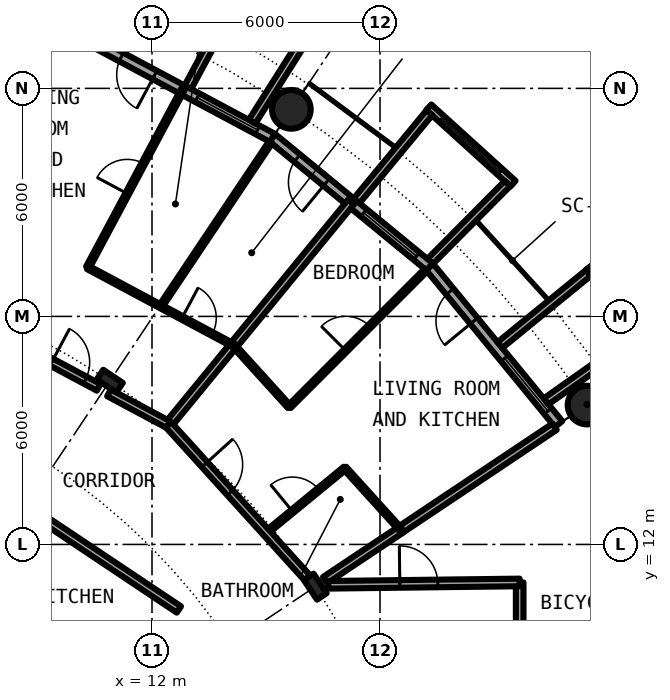
"""IFC4 building model, lengths in metres.
Left out: names, types, materials, properties, quantities, classifications, styles, units other than length and angle.
Written with IfcOpenShell. Run it as: python <this file> out.ifc"""

import sys

from ifc_helpers import new_model, si_unit, direction, frame, frame_2d, origin, origin_2d, place, context, subcontext, project, spatial, rectangle, circle, hollow_circle, i_section, extrude, element, fill, save


model = new_model("IFC4")
c1 = context("Model", 3, precision=1e-05, world=origin(), true_north=direction((0.0, 1.0)))
c2 = subcontext(c1, "Body", "Model", "MODEL_VIEW")
j1 = project(units=[si_unit("LENGTHUNIT", "METRE"), si_unit("PLANEANGLEUNIT", "RADIAN")], contexts=[c1])
p1 = place(None, origin())
s1 = spatial("IfcSite", under=j1, at=p1, CompositionType="ELEMENT")
p2 = place(p1, origin())
s2 = spatial("IfcBuilding", under=s1, at=p2, CompositionType="ELEMENT")
p3 = place(p2, frame((0.0, 0.0, 22.8)))
s3 = spatial("IfcBuildingStorey", under=s2, at=p3, CompositionType="ELEMENT", Elevation=22.8)
for number, where, z_axis, x_axis in (
    (1, (23.448, 15.667, 0.0), (0.0, 0.0, 1.0), (1.0, 0.0, 0.0)),
    (2, (15.667, 23.448, 0.0), (0.0, 0.0, 1.0), (1.0, 0.0, 0.0)),
):
    element("IfcColumn", number, at=place(p3, frame(where, z_axis=z_axis, x_axis=x_axis)), inside=s3, PredefinedType="COLUMN", context=c2, shape_type="SweptSolid", body=[
        extrude(hollow_circle(Radius=0.508, WallThickness=0.05, at=origin_2d()), origin(), (0.0, 0.0, 1.0), 3.05),
    ])
for number, where, z_axis, x_axis in (
    (3, (16.297, 10.889, 0.0), (0.0, 0.0, 1.0), (0.831, 0.556, 0.0)),
    (4, (10.889, 16.297, 0.0), (0.0, 0.0, 1.0), (0.556, 0.831, 0.0)),
):
    element("IfcColumn", number, at=place(p3, frame(where, z_axis=z_axis, x_axis=x_axis)), inside=s3, PredefinedType="COLUMN", context=c2, shape_type="SweptSolid", body=[
        extrude(i_section(OverallWidth=0.305, OverallDepth=0.62, WebThickness=0.021, FlangeThickness=0.04, FilletRadius=0.027, at=origin_2d()), origin(), (0.0, 0.0, 1.0), 3.05),
    ])
p4 = place(p3, frame((22.699, 15.167, 0.0), z_axis=(0.0, 0.0, 1.0), x_axis=(-0.634382322723, 0.773019449054, 0.0)))
e5 = element("IfcWall", 5, at=p4, inside=s3, PredefinedType="SOLIDWALL", context=c2, shape_type="SweptSolid", body=[
    extrude(rectangle(XDim=5.352, YDim=0.25, at=frame_2d((2.676, 0.0))), origin(), (0.0, 0.0, 1.0), 2.7),
])
p5 = place(p4, frame((0.441, 0.0, 0.3)))
e6 = element("IfcOpeningElement", 6, at=p5, cuts=e5, PredefinedType="OPENING", context=c2, shape_type="SweptSolid", body=[
    extrude(rectangle(XDim=1.8, YDim=2.1, at=frame_2d((0.9, 1.05))), frame((0.0, 0.135, 0.0), z_axis=(0.0, -1.0, 0.0), x_axis=(1.0, 0.0, 0.0)), (0.0, 0.0, 1.0), 0.27),
])
p6 = place(p4, frame((3.51, 0.0, 0.0)))
e7 = element("IfcOpeningElement", 7, at=p6, cuts=e5, PredefinedType="OPENING", context=c2, shape_type="SweptSolid", body=[
    extrude(rectangle(XDim=1.0, YDim=2.2, at=frame_2d((0.5, 1.1))), frame((0.0, 0.135, 0.0), z_axis=(0.0, -1.0, 0.0), x_axis=(1.0, 0.0, 0.0)), (0.0, 0.0, 1.0), 0.27),
])
p7 = place(p3, frame((24.909, 17.427, -0.03), z_axis=(0.0, 0.0, 1.0), x_axis=(-0.60418752353, 0.796842165306, 0.0)))
e8 = element("IfcWall", 8, at=p7, inside=s3, PredefinedType="SOLIDWALL", context=c2, shape_type="SweptSolid", body=[
    extrude(rectangle(XDim=2.337, YDim=0.2, at=frame_2d((1.168, 0.0))), origin(), (0.0, 0.0, 1.0), 2.73),
])
p8 = place(p7, frame((0.128, 0.0, 0.33)))
e9 = element("IfcOpeningElement", 9, at=p8, cuts=e8, PredefinedType="OPENING", context=c2, shape_type="SweptSolid", body=[
    extrude(circle(Radius=1.04, at=frame_2d((1.04, 1.04))), frame((0.0, 0.11, 0.0), z_axis=(0.0, -1.0, 0.0), x_axis=(1.0, 0.0, 0.0)), (0.0, 0.0, 1.0), 0.22),
])
p9 = place(p3, frame((22.37, 15.765, -0.03), z_axis=(0.0, 0.0, 1.0), x_axis=(0.817256123454, 0.576274612209, 0.0)))
e10 = element("IfcWall", 10, at=p9, inside=s3, PredefinedType="SOLIDWALL", context=c2, shape_type="SweptSolid", body=[
    extrude(rectangle(XDim=2.933, YDim=0.2, at=frame_2d((1.466, 0.0))), origin(), (0.0, 0.0, 1.0), 2.73),
])
p10 = place(p3, frame((21.155, 17.246, -0.03), z_axis=(0.0, 0.0, 1.0), x_axis=(0.775179004516, 0.631741648902, 0.0)))
e11 = element("IfcWall", 11, at=p10, inside=s3, PredefinedType="SOLIDWALL", context=c2, shape_type="SweptSolid", body=[
    extrude(rectangle(XDim=3.006, YDim=0.2, at=frame_2d((1.503, 0.0))), origin(), (0.0, 0.0, 1.0), 2.73),
])
p11 = place(p3, frame((19.304, 19.304, 0.0), z_axis=(0.0, 0.0, 1.0), x_axis=(-0.773019449054, 0.634382322723, 0.0)))
e12 = element("IfcWall", 12, at=p11, inside=s3, PredefinedType="SOLIDWALL", context=c2, shape_type="SweptSolid", body=[
    extrude(rectangle(XDim=5.352, YDim=0.25, at=frame_2d((2.676, 0.0))), origin(), (0.0, 0.0, 1.0), 2.7),
])
p12 = place(p11, frame((0.441, 0.0, 0.3)))
e13 = element("IfcOpeningElement", 13, at=p12, cuts=e12, PredefinedType="OPENING", context=c2, shape_type="SweptSolid", body=[
    extrude(rectangle(XDim=1.8, YDim=2.1, at=frame_2d((0.9, 1.05))), frame((0.0, 0.135, 0.0), z_axis=(0.0, -1.0, 0.0), x_axis=(1.0, 0.0, 0.0)), (0.0, 0.0, 1.0), 0.27),
])
p13 = place(p11, frame((3.51, 0.0, 0.0)))
e14 = element("IfcOpeningElement", 14, at=p13, cuts=e12, PredefinedType="OPENING", context=c2, shape_type="SweptSolid", body=[
    extrude(rectangle(XDim=1.0, YDim=2.2, at=frame_2d((0.5, 1.1))), frame((0.0, 0.135, 0.0), z_axis=(0.0, -1.0, 0.0), x_axis=(1.0, 0.0, 0.0)), (0.0, 0.0, 1.0), 0.27),
])
p14 = place(p3, frame((21.5, 21.493, -0.03), z_axis=(0.0, 0.0, 1.0), x_axis=(-0.740998365753, 0.671506829416, 0.0)))
e15 = element("IfcWall", 15, at=p14, inside=s3, PredefinedType="SOLIDWALL", context=c2, shape_type="SweptSolid", body=[
    extrude(rectangle(XDim=2.993, YDim=0.2, at=frame_2d((1.497, 0.0))), origin(), (0.0, 0.0, 1.0), 2.73),
])
p15 = place(p14, frame((0.457, 0.0, 0.33)))
e16 = element("IfcOpeningElement", 16, at=p15, cuts=e15, PredefinedType="OPENING", context=c2, shape_type="SweptSolid", body=[
    extrude(circle(Radius=1.04, at=frame_2d((1.04, 1.04))), frame((0.0, 0.11, 0.0), z_axis=(0.0, -1.0, 0.0), x_axis=(1.0, 0.0, 0.0)), (0.0, 0.0, 1.0), 0.22),
])
p16 = place(p3, frame((19.323, 19.45, -0.03), z_axis=(0.0, 0.0, 1.0), x_axis=(0.704476739375, 0.709727076896, 0.0)))
e17 = element("IfcWall", 17, at=p16, inside=s3, PredefinedType="SOLIDWALL", context=c2, shape_type="SweptSolid", body=[
    extrude(rectangle(XDim=2.883, YDim=0.2, at=frame_2d((1.441, 0.0))), origin(), (0.0, 0.0, 1.0), 2.73),
])
p17 = place(p3, frame((17.384, 21.041, -0.03), z_axis=(0.0, 0.0, 1.0), x_axis=(0.63709551667, 0.770784861449, 0.0)))
e18 = element("IfcWall", 18, at=p17, inside=s3, PredefinedType="SOLIDWALL", context=c2, shape_type="SweptSolid", body=[
    extrude(rectangle(XDim=3.006, YDim=0.2, at=frame_2d((1.503, 0.0))), origin(), (0.0, 0.0, 1.0), 2.73),
])
p18 = place(p3, frame((15.167, 22.699, 0.0), z_axis=(0.0, 0.0, 1.0), x_axis=(-0.881915646801, 0.471407246368, 0.0)))
e19 = element("IfcWall", 19, at=p18, inside=s3, PredefinedType="SOLIDWALL", context=c2, shape_type="SweptSolid", body=[
    extrude(rectangle(XDim=5.352, YDim=0.25, at=frame_2d((2.676, 0.0))), origin(), (0.0, 0.0, 1.0), 2.7),
])
p19 = place(p18, frame((0.441, 0.0, 0.3)))
e20 = element("IfcOpeningElement", 20, at=p19, cuts=e19, PredefinedType="OPENING", context=c2, shape_type="SweptSolid", body=[
    extrude(rectangle(XDim=1.8, YDim=2.1, at=frame_2d((0.9, 1.05))), frame((0.0, 0.135, 0.0), z_axis=(0.0, -1.0, 0.0), x_axis=(1.0, 0.0, 0.0)), (0.0, 0.0, 1.0), 0.27),
])
p20 = place(p18, frame((3.51, 0.0, 0.0)))
e21 = element("IfcOpeningElement", 21, at=p20, cuts=e19, PredefinedType="OPENING", context=c2, shape_type="SweptSolid", body=[
    extrude(rectangle(XDim=1.0, YDim=2.2, at=frame_2d((0.5, 1.1))), frame((0.0, 0.135, 0.0), z_axis=(0.0, -1.0, 0.0), x_axis=(1.0, 0.0, 0.0)), (0.0, 0.0, 1.0), 0.27),
])
p21 = place(p3, frame((14.635, 23.126, -0.03), z_axis=(0.0, 0.0, 1.0), x_axis=(0.534437802731, 0.845207805816, 0.0)))
e22 = element("IfcWall", 22, at=p21, inside=s3, PredefinedType="SOLIDWALL", context=c2, shape_type="SweptSolid", body=[
    extrude(rectangle(XDim=2.932, YDim=0.2, at=frame_2d((1.466, 0.0))), origin(), (0.0, 0.0, 1.0), 2.73),
])
p22 = place(p3, frame((12.945, 24.029, -0.03), z_axis=(0.0, 0.0, 1.0), x_axis=(0.474424310775, 0.88029629861, 0.0)))
e23 = element("IfcWall", 23, at=p22, inside=s3, PredefinedType="SOLIDWALL", context=c2, shape_type="SweptSolid", body=[
    extrude(rectangle(XDim=3.006, YDim=0.2, at=frame_2d((1.503, 0.0))), origin(), (0.0, 0.0, 1.0), 2.73),
])
p23 = place(p3, frame((21.675, 9.4, 0.0), z_axis=(0.0, 0.0, 1.0), x_axis=(0.0, 1.0, 0.0)))
e24 = element("IfcWall", 24, at=p23, inside=s3, PredefinedType="PARTITIONING", context=c2, shape_type="SweptSolid", body=[
    extrude(rectangle(XDim=1.6, YDim=0.2, at=frame_2d((0.8, 0.0))), origin(), (0.0, 0.0, 1.0), 2.7),
])
p24 = place(p3, frame((10.31, 19.289, 0.0), z_axis=(0.0, 0.0, 1.0), x_axis=(0.47140999111, 0.881914179658, 0.0)))
e25 = element("IfcWall", 25, at=p24, inside=s3, PredefinedType="PARTITIONING", context=c2, shape_type="SweptSolid", body=[
    extrude(rectangle(XDim=5.303, YDim=0.1, at=frame_2d((2.652, 0.0))), origin(), (0.0, 0.0, 1.0), 2.7),
])
p25 = place(p24, frame((2.202, 0.0, 0.0)))
e26 = element("IfcOpeningElement", 26, at=p25, cuts=e25, PredefinedType="OPENING", context=c2, shape_type="SweptSolid", body=[
    extrude(rectangle(XDim=0.9, YDim=2.3, at=frame_2d((0.45, 1.15))), frame((0.0, 0.06, 0.0), z_axis=(0.0, -1.0, 0.0), x_axis=(1.0, 0.0, 0.0)), (0.0, 0.0, 1.0), 0.12),
])
p26 = place(p3, frame((12.229, 18.264, 0.0), z_axis=(0.0, 0.0, 1.0), x_axis=(0.556271707676, 0.83100047367, 0.0)))
e27 = element("IfcWall", 27, at=p26, inside=s3, PredefinedType="PARTITIONING", context=c2, shape_type="SweptSolid", body=[
    extrude(rectangle(XDim=5.195, YDim=0.1, at=frame_2d((2.598, 0.0))), origin(), (0.0, 0.0, 1.0), 2.7),
])
p27 = place(p3, frame((12.432, 15.152, 0.0), z_axis=(0.0, 0.0, 1.0), x_axis=(0.634353152115, 0.77304338714, 0.0)))
e28 = element("IfcWall", 28, at=p27, inside=s3, PredefinedType="PARTITIONING", context=c2, shape_type="SweptSolid", body=[
    extrude(rectangle(XDim=7.576, YDim=0.2, at=frame_2d((3.788, 0.0))), origin(), (0.0, 0.0, 1.0), 2.7),
])
p28 = place(p3, frame((15.009, 12.31, 0.0), z_axis=(0.0, 0.0, 1.0), x_axis=(0.77319617123, 0.634166918717, 0.0)))
e29 = element("IfcWall", 29, at=p28, inside=s3, PredefinedType="PARTITIONING", context=c2, shape_type="SweptSolid", body=[
    extrude(rectangle(XDim=2.675, YDim=0.1, at=frame_2d((1.337, 0.0))), origin(), (0.0, 0.0, 1.0), 2.7),
])
p29 = place(p28, frame((0.887, 0.0, 0.0)))
e30 = element("IfcOpeningElement", 30, at=p29, cuts=e29, PredefinedType="OPENING", context=c2, shape_type="SweptSolid", body=[
    extrude(rectangle(XDim=0.9, YDim=2.3, at=frame_2d((0.45, 1.15))), frame((0.0, 0.06, 0.0), z_axis=(0.0, -1.0, 0.0), x_axis=(1.0, 0.0, 0.0)), (0.0, 0.0, 1.0), 0.12),
])
p30 = place(p3, frame((15.612, 15.622, 0.0), z_axis=(0.0, 0.0, 1.0), x_axis=(0.706914880313, 0.707298629994, 0.0)))
e31 = element("IfcWall", 31, at=p30, inside=s3, PredefinedType="PARTITIONING", context=c2, shape_type="SweptSolid", body=[
    extrude(rectangle(XDim=5.09, YDim=0.1, at=frame_2d((2.545, 0.0))), origin(), (0.0, 0.0, 1.0), 2.7),
])
p31 = place(p30, frame((2.095, 0.0, 0.0)))
e32 = element("IfcOpeningElement", 32, at=p31, cuts=e31, PredefinedType="OPENING", context=c2, shape_type="SweptSolid", body=[
    extrude(rectangle(XDim=0.9, YDim=2.3, at=frame_2d((0.45, 1.15))), frame((0.0, 0.06, 0.0), z_axis=(0.0, -1.0, 0.0), x_axis=(1.0, 0.0, 0.0)), (0.0, 0.0, 1.0), 0.12),
])
p32 = place(p3, frame((18.542, 12.389, 0.0), z_axis=(0.0, 0.0, 1.0), x_axis=(0.831387096605, 0.55569370664, 0.0)))
e33 = element("IfcWall", 33, at=p32, inside=s3, PredefinedType="PARTITIONING", context=c2, shape_type="SweptSolid", body=[
    extrude(rectangle(XDim=4.875, YDim=0.2, at=frame_2d((2.438, 0.0))), origin(), (0.0, 0.0, 1.0), 2.7),
])
p33 = place(p3, frame((16.555, 11.061, 0.0), z_axis=(0.0, 0.0, 1.0), x_axis=(0.832066006555, 0.554676627176, 0.0)))
e34 = element("IfcWall", 34, at=p33, inside=s3, PredefinedType="PARTITIONING", context=c2, shape_type="SweptSolid", body=[
    extrude(rectangle(XDim=2.39, YDim=0.2, at=frame_2d((1.195, 0.0))), origin(), (0.0, 0.0, 1.0), 2.7),
])
p34 = place(p3, frame((16.637, 10.938, 0.0), z_axis=(0.0, 0.0, 1.0), x_axis=(0.99992425795, 0.012307654658, 0.0)))
e35 = element("IfcWall", 35, at=p34, inside=s3, PredefinedType="PARTITIONING", context=c2, shape_type="SweptSolid", body=[
    extrude(rectangle(XDim=5.039, YDim=0.2, at=frame_2d((2.519, 0.0))), origin(), (0.0, 0.0, 1.0), 2.7),
])
p35 = place(p34, frame((1.884, 0.0, 0.0)))
e36 = element("IfcOpeningElement", 36, at=p35, cuts=e35, PredefinedType="OPENING", context=c2, shape_type="SweptSolid", body=[
    extrude(rectangle(XDim=1.0, YDim=2.3, at=frame_2d((0.5, 1.15))), frame((0.0, 0.11, 0.0), z_axis=(0.0, -1.0, 0.0), x_axis=(1.0, 0.0, 0.0)), (0.0, 0.0, 1.0), 0.22),
])
p36 = place(p3, frame((6.159, 11.663, 0.0), z_axis=(0.0, 0.0, 1.0), x_axis=(0.831459707426, -0.555585056429, 0.0)))
e37 = element("IfcWall", 37, at=p36, inside=s3, PredefinedType="PARTITIONING", context=c2, shape_type="SweptSolid", body=[
    extrude(rectangle(XDim=4.073, YDim=0.1, at=frame_2d((2.037, 0.0))), origin(), (0.0, 0.0, 1.0), 2.7),
])
p37 = place(p3, frame((3.299, 16.574, 0.0), z_axis=(0.0, 0.0, 1.0), x_axis=(0.831482209042, -0.555551380205, 0.0)))
e38 = element("IfcWall", 38, at=p37, inside=s3, PredefinedType="PARTITIONING", context=c2, shape_type="SweptSolid", body=[
    extrude(rectangle(XDim=11.315, YDim=0.2, at=frame_2d((5.657, 0.0))), origin(), (0.0, 0.0, 1.0), 2.7),
])
p38 = place(p37, frame((4.346, 0.0, 0.0)))
e39 = element("IfcOpeningElement", 39, at=p38, cuts=e38, PredefinedType="OPENING", context=c2, shape_type="SweptSolid", body=[
    extrude(rectangle(XDim=1.0, YDim=2.3, at=frame_2d((0.5, 1.15))), frame((0.0, 0.11, 0.0), z_axis=(0.0, -1.0, 0.0), x_axis=(1.0, 0.0, 0.0)), (0.0, 0.0, 1.0), 0.22),
])
p39 = place(p3, frame((5.69, 18.756, 0.0), z_axis=(0.0, 0.0, 1.0), x_axis=(0.881866548297, -0.471499089072, 0.0)))
e40 = element("IfcWall", 40, at=p39, inside=s3, PredefinedType="PARTITIONING", context=c2, shape_type="SweptSolid", body=[
    extrude(rectangle(XDim=5.563, YDim=0.2, at=frame_2d((2.782, 0.0))), origin(), (0.0, 0.0, 1.0), 2.38),
])
p40 = place(p39, frame((4.161, 0.0, 0.0)))
e41 = element("IfcOpeningElement", 41, at=p40, cuts=e40, PredefinedType="OPENING", context=c2, shape_type="SweptSolid", body=[
    extrude(rectangle(XDim=1.0, YDim=2.3, at=frame_2d((0.5, 1.15))), frame((0.0, 0.11, 0.0), z_axis=(0.0, -1.0, 0.0), x_axis=(1.0, 0.0, 0.0)), (0.0, 0.0, 1.0), 0.22),
])
p41 = place(p3, frame((10.867, 15.989, 0.0), z_axis=(0.0, 0.0, 1.0), x_axis=(0.88180855718, -0.471607536501, 0.0)))
e42 = element("IfcWall", 42, at=p41, inside=s3, PredefinedType="PARTITIONING", context=c2, shape_type="SweptSolid", body=[
    extrude(rectangle(XDim=1.777, YDim=0.2, at=frame_2d((0.889, 0.0))), origin(), (0.0, 0.0, 1.0), 2.38),
])
p42 = place(p3, frame((12.434, 15.151, 0.0), z_axis=(0.0, 0.0, 1.0), x_axis=(0.671514934772, -0.740991020444, 0.0)))
e43 = element("IfcWall", 43, at=p42, inside=s3, PredefinedType="PARTITIONING", context=c2, shape_type="SweptSolid", body=[
    extrude(rectangle(XDim=5.598, YDim=0.2, at=frame_2d((2.799, 0.0))), origin(), (0.0, 0.0, 1.0), 2.38),
])
p43 = place(p42, frame((1.417, 0.0, 0.0)))
e44 = element("IfcOpeningElement", 44, at=p43, cuts=e43, PredefinedType="OPENING", context=c2, shape_type="SweptSolid", body=[
    extrude(rectangle(XDim=1.0, YDim=2.3, at=frame_2d((0.5, 1.15))), frame((0.0, 0.11, 0.0), z_axis=(0.0, -1.0, 0.0), x_axis=(1.0, 0.0, 0.0)), (0.0, 0.0, 1.0), 0.22),
])
p44 = place(p3, frame((10.312, 19.288, 0.0), z_axis=(0.0, 0.0, 1.0), x_axis=(0.881763472003, -0.471691826769, 0.0)))
e45 = element("IfcWall", 45, at=p44, inside=s3, PredefinedType="PARTITIONING", context=c2, shape_type="SweptSolid", body=[
    extrude(rectangle(XDim=4.35, YDim=0.1, at=frame_2d((2.175, 0.0))), origin(), (0.0, 0.0, 1.0), 2.7),
])
p45 = place(p44, frame((2.811, 0.0, 0.0)))
e46 = element("IfcOpeningElement", 46, at=p45, cuts=e45, PredefinedType="OPENING", context=c2, shape_type="SweptSolid", body=[
    extrude(rectangle(XDim=0.9, YDim=2.3, at=frame_2d((0.45, 1.15))), frame((0.0, 0.06, 0.0), z_axis=(0.0, -1.0, 0.0), x_axis=(1.0, 0.0, 0.0)), (0.0, 0.0, 1.0), 0.12),
])
p46 = place(p3, frame((14.147, 17.238, 0.0), z_axis=(0.0, 0.0, 1.0), x_axis=(0.671674967707, -0.740845960882, 0.0)))
e47 = element("IfcWall", 47, at=p46, inside=s3, PredefinedType="PARTITIONING", context=c2, shape_type="SweptSolid", body=[
    extrude(rectangle(XDim=2.181, YDim=0.1, at=frame_2d((1.091, 0.0))), origin(), (0.0, 0.0, 1.0), 2.7),
])
p47 = place(p3, frame((17.072, 14.011, 0.0), z_axis=(0.0, 0.0, 1.0), x_axis=(0.67169789574, -0.740825172937, 0.0)))
e48 = element("IfcWall", 48, at=p47, inside=s3, PredefinedType="PARTITIONING", context=c2, shape_type="SweptSolid", body=[
    extrude(rectangle(XDim=2.183, YDim=0.1, at=frame_2d((1.091, 0.0))), origin(), (0.0, 0.0, 1.0), 2.7),
])
p48 = place(p5, origin())
e49 = element("IfcWindow", 49, at=p48, inside=s3, PartitioningType="SINGLE_PANEL", PredefinedType="WINDOW", context=c2, shape_type="SweptSolid", body=[
    extrude(rectangle(XDim=1.8, YDim=2.1, at=frame_2d((0.9, 1.05))), frame((0.0, 0.03, 0.0), z_axis=(0.0, -1.0, 0.0), x_axis=(1.0, 0.0, 0.0)), (0.0, 0.0, 1.0), 0.06),
])
fill(e6, e49)
p49 = place(p6, origin())
e50 = element("IfcDoor", 50, at=p49, inside=s3, OperationType="SINGLE_SWING_LEFT", PredefinedType="DOOR", context=c2, shape_type="SweptSolid", body=[
    extrude(rectangle(XDim=1.0, YDim=2.2, at=frame_2d((0.5, 1.1))), frame((0.0, 0.025, 0.0), z_axis=(0.0, -1.0, 0.0), x_axis=(1.0, 0.0, 0.0)), (0.0, 0.0, 1.0), 0.05),
])
fill(e7, e50)
p50 = place(p12, origin())
e51 = element("IfcWindow", 51, at=p50, inside=s3, PartitioningType="SINGLE_PANEL", PredefinedType="WINDOW", context=c2, shape_type="SweptSolid", body=[
    extrude(rectangle(XDim=1.8, YDim=2.1, at=frame_2d((0.9, 1.05))), frame((0.0, 0.03, 0.0), z_axis=(0.0, -1.0, 0.0), x_axis=(1.0, 0.0, 0.0)), (0.0, 0.0, 1.0), 0.06),
])
fill(e13, e51)
p51 = place(p15, origin())
e52 = element("IfcWindow", 52, at=p51, inside=s3, PartitioningType="SINGLE_PANEL", PredefinedType="WINDOW", context=c2, shape_type="SweptSolid", body=[
    extrude(circle(Radius=1.04, at=frame_2d((1.04, 1.04))), frame((0.0, 0.03, 0.0), z_axis=(0.0, -1.0, 0.0), x_axis=(1.0, 0.0, 0.0)), (0.0, 0.0, 1.0), 0.06),
])
fill(e16, e52)
p52 = place(p13, origin())
e53 = element("IfcDoor", 53, at=p52, inside=s3, OperationType="SINGLE_SWING_LEFT", PredefinedType="DOOR", context=c2, shape_type="SweptSolid", body=[
    extrude(rectangle(XDim=1.0, YDim=2.2, at=frame_2d((0.5, 1.1))), frame((0.0, 0.025, 0.0), z_axis=(0.0, -1.0, 0.0), x_axis=(1.0, 0.0, 0.0)), (0.0, 0.0, 1.0), 0.05),
])
fill(e14, e53)
p53 = place(p19, origin())
e54 = element("IfcWindow", 54, at=p53, inside=s3, PartitioningType="SINGLE_PANEL", PredefinedType="WINDOW", context=c2, shape_type="SweptSolid", body=[
    extrude(rectangle(XDim=1.8, YDim=2.1, at=frame_2d((0.9, 1.05))), frame((0.0, 0.03, 0.0), z_axis=(0.0, -1.0, 0.0), x_axis=(1.0, 0.0, 0.0)), (0.0, 0.0, 1.0), 0.06),
])
fill(e20, e54)
p54 = place(p20, origin())
e55 = element("IfcDoor", 55, at=p54, inside=s3, OperationType="SINGLE_SWING_LEFT", PredefinedType="DOOR", context=c2, shape_type="SweptSolid", body=[
    extrude(rectangle(XDim=1.0, YDim=2.2, at=frame_2d((0.5, 1.1))), frame((0.0, 0.025, 0.0), z_axis=(0.0, -1.0, 0.0), x_axis=(1.0, 0.0, 0.0)), (0.0, 0.0, 1.0), 0.05),
])
fill(e21, e55)
p55 = place(p43, origin())
e56 = element("IfcDoor", 56, at=p55, inside=s3, OperationType="SINGLE_SWING_LEFT", PredefinedType="DOOR", context=c2, shape_type="SweptSolid", body=[
    extrude(rectangle(XDim=1.0, YDim=2.3, at=frame_2d((0.5, 1.15))), frame((0.0, 0.025, 0.0), z_axis=(0.0, -1.0, 0.0), x_axis=(1.0, 0.0, 0.0)), (0.0, 0.0, 1.0), 0.05),
])
fill(e44, e56)
p56 = place(p29, origin())
e57 = element("IfcDoor", 57, at=p56, inside=s3, OperationType="SINGLE_SWING_RIGHT", PredefinedType="DOOR", context=c2, shape_type="SweptSolid", body=[
    extrude(rectangle(XDim=0.9, YDim=2.3, at=frame_2d((0.45, 1.15))), frame((0.0, 0.025, 0.0), z_axis=(0.0, -1.0, 0.0), x_axis=(1.0, 0.0, 0.0)), (0.0, 0.0, 1.0), 0.05),
])
fill(e30, e57)
p57 = place(p31, origin())
e58 = element("IfcDoor", 58, at=p57, inside=s3, OperationType="SINGLE_SWING_LEFT", PredefinedType="DOOR", context=c2, shape_type="SweptSolid", body=[
    extrude(rectangle(XDim=0.9, YDim=2.3, at=frame_2d((0.45, 1.15))), frame((0.0, 0.025, 0.0), z_axis=(0.0, -1.0, 0.0), x_axis=(1.0, 0.0, 0.0)), (0.0, 0.0, 1.0), 0.05),
])
fill(e32, e58)
p58 = place(p40, origin())
e59 = element("IfcDoor", 59, at=p58, inside=s3, OperationType="SINGLE_SWING_RIGHT", PredefinedType="DOOR", context=c2, shape_type="SweptSolid", body=[
    extrude(rectangle(XDim=1.0, YDim=2.3, at=frame_2d((0.5, 1.15))), frame((0.0, 0.025, 0.0), z_axis=(0.0, -1.0, 0.0), x_axis=(1.0, 0.0, 0.0)), (0.0, 0.0, 1.0), 0.05),
])
fill(e41, e59)
p59 = place(p25, origin())
e60 = element("IfcDoor", 60, at=p59, inside=s3, OperationType="SINGLE_SWING_RIGHT", PredefinedType="DOOR", context=c2, shape_type="SweptSolid", body=[
    extrude(rectangle(XDim=0.9, YDim=2.3, at=frame_2d((0.45, 1.15))), frame((0.0, 0.025, 0.0), z_axis=(0.0, -1.0, 0.0), x_axis=(1.0, 0.0, 0.0)), (0.0, 0.0, 1.0), 0.05),
])
fill(e26, e60)
p60 = place(p45, origin())
e61 = element("IfcDoor", 61, at=p60, inside=s3, OperationType="SINGLE_SWING_RIGHT", PredefinedType="DOOR", context=c2, shape_type="SweptSolid", body=[
    extrude(rectangle(XDim=0.9, YDim=2.3, at=frame_2d((0.45, 1.15))), frame((0.0, 0.025, 0.0), z_axis=(0.0, -1.0, 0.0), x_axis=(1.0, 0.0, 0.0)), (0.0, 0.0, 1.0), 0.05),
])
fill(e46, e61)
p61 = place(p35, origin())
e62 = element("IfcDoor", 62, at=p61, inside=s3, OperationType="SINGLE_SWING_LEFT", PredefinedType="DOOR", context=c2, shape_type="SweptSolid", body=[
    extrude(rectangle(XDim=1.0, YDim=2.3, at=frame_2d((0.5, 1.15))), frame((0.0, 0.025, 0.0), z_axis=(0.0, -1.0, 0.0), x_axis=(1.0, 0.0, 0.0)), (0.0, 0.0, 1.0), 0.05),
])
fill(e36, e62)
save(model, sys.argv[1])
